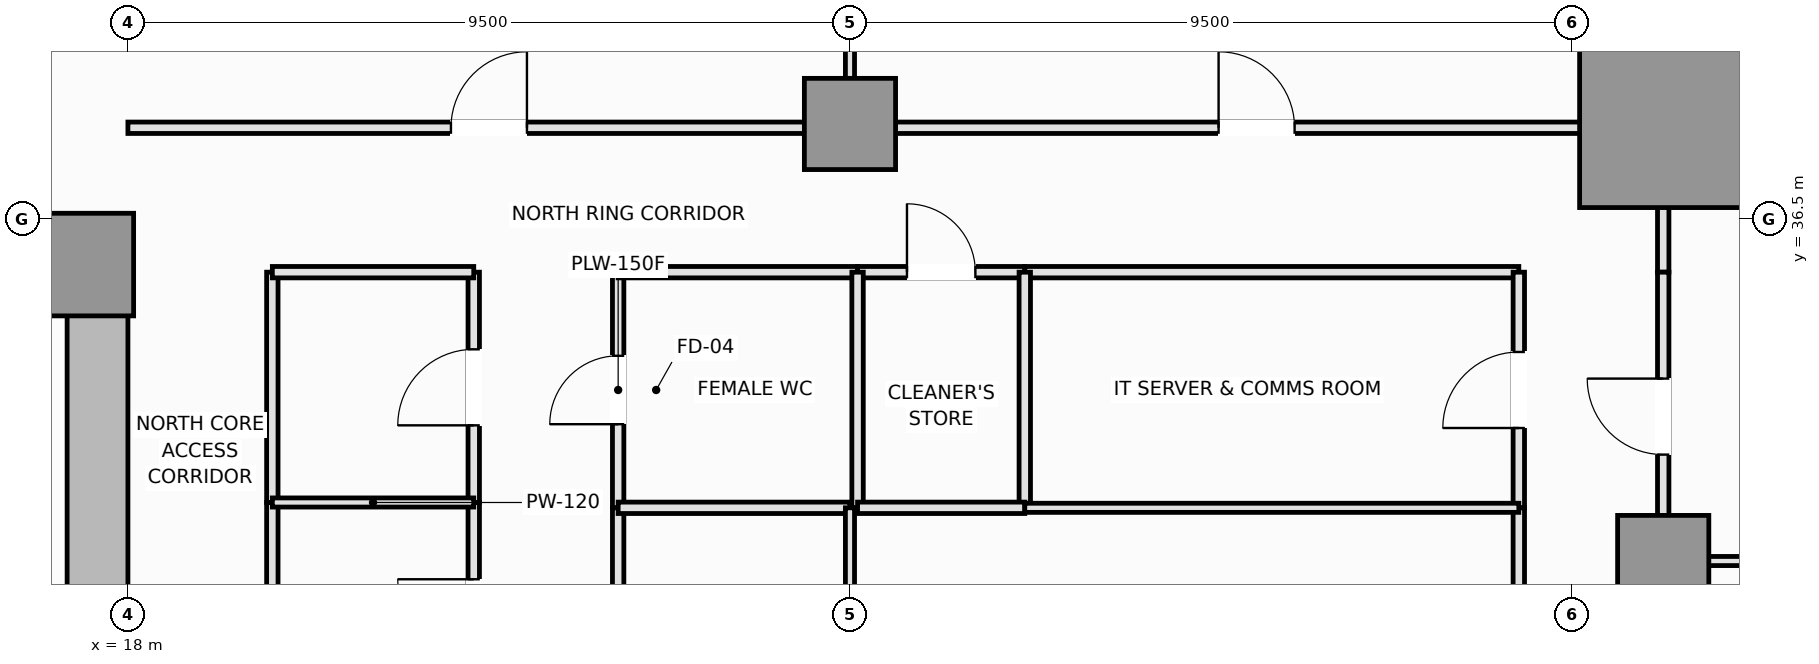
"""IFC4 building model, lengths in metres.
Left out: names, types, materials, properties, quantities, classifications, styles, units other than length and angle.
Written with IfcOpenShell. Run it as: python <this file> out.ifc"""

import sys

from ifc_helpers import new_model, si_unit, direction, frame, frame_2d, origin, origin_2d, place, context, subcontext, project, spatial, rectangle, extrude, element, fill, save


model = new_model("IFC4")
c1 = context("Model", 3, precision=1e-05, world=origin(), true_north=direction((0.0, 1.0)))
c2 = subcontext(c1, "Body", "Model", "MODEL_VIEW")
j1 = project(units=[si_unit("LENGTHUNIT", "METRE"), si_unit("PLANEANGLEUNIT", "RADIAN")], contexts=[c1])
p1 = place(None, origin())
s1 = spatial("IfcSite", under=j1, at=p1, CompositionType="ELEMENT")
p2 = place(p1, origin())
s2 = spatial("IfcBuilding", under=s1, at=p2, CompositionType="ELEMENT")
p3 = place(p2, frame((0.0, 0.0, 29.15)))
s3 = spatial("IfcBuildingStorey", under=s2, at=p3, CompositionType="ELEMENT", Elevation=29.15)
p4 = place(p3, frame((4.5, 36.1, 0.0), z_axis=(0.0, 0.0, 1.0), x_axis=(1.0, 0.0, 0.0)))
e1 = element("IfcWall", 1, at=p4, inside=s3, PredefinedType="SHEAR", context=c2, shape_type="SweptSolid", body=[
    extrude(rectangle(XDim=13.5, YDim=0.8, at=frame_2d((6.75, 0.0))), origin(), (0.0, 0.0, 1.0), 3.55),
])
p5 = place(p3, frame((17.6, 27.05, 0.0), z_axis=(0.0, 0.0, 1.0), x_axis=(0.0, 1.0, 0.0)))
e2 = element("IfcWall", 2, at=p5, inside=s3, PredefinedType="SHEAR", context=c2, shape_type="SweptSolid", body=[
    extrude(rectangle(XDim=8.65, YDim=0.8, at=frame_2d((4.325, 0.0))), origin(), (0.0, 0.0, 1.0), 3.55),
])
p6 = place(p5, frame((3.45, 0.0, 0.0)))
e3 = element("IfcOpeningElement", 3, at=p6, cuts=e2, PredefinedType="OPENING", context=c2, shape_type="SweptSolid", body=[
    extrude(rectangle(XDim=1.1, YDim=2.15, at=frame_2d((0.55, 1.075))), frame((0.0, 0.41, 0.0), z_axis=(0.0, -1.0, 0.0), x_axis=(1.0, 0.0, 0.0)), (0.0, 0.0, 1.0), 0.82),
])
p7 = place(p3, frame((17.4, 35.9, 0.0), z_axis=(0.0, 0.0, 1.0), x_axis=(1.0, 0.0, 0.0)))
e4 = element("IfcColumn", 4, at=p7, inside=s3, PredefinedType="PILASTER", context=c2, shape_type="SweptSolid", body=[
    extrude(rectangle(XDim=1.35, YDim=1.35, at=origin_2d()), origin(), (0.0, 0.0, 1.0), 3.55),
])
p8 = place(p3, frame((38.2, 37.75, 0.0), z_axis=(0.0, 0.0, 1.0), x_axis=(1.0, 0.0, 0.0)))
e5 = element("IfcColumn", 5, at=p8, inside=s3, PredefinedType="COLUMN", context=c2, shape_type="SweptSolid", body=[
    extrude(rectangle(XDim=2.2, YDim=2.2, at=origin_2d()), origin(), (0.0, 0.0, 1.0), 3.55),
])
for number, where, z_axis, x_axis in (
    (6, (27.5, 37.75, 0.0), (0.0, 0.0, 1.0), (1.0, 0.0, 0.0)),
    (7, (38.2, 32.0, 0.0), (0.0, 0.0, 1.0), (1.0, 0.0, 0.0)),
):
    element("IfcColumn", number, at=place(p3, frame(where, z_axis=z_axis, x_axis=x_axis)), inside=s3, PredefinedType="COLUMN", context=c2, shape_type="SweptSolid", body=[
        extrude(rectangle(XDim=1.2, YDim=1.2, at=origin_2d()), origin(), (0.0, 0.0, 1.0), 3.55),
    ])
p9 = place(p3, frame((22.55, 29.75, 0.0), z_axis=(0.0, 0.0, 1.0), x_axis=(0.0, 1.0, 0.0)))
e8 = element("IfcWall", 8, at=p9, inside=s3, PredefinedType="PARTITIONING", context=c2, shape_type="SweptSolid", body=[
    extrude(rectangle(XDim=3.02, YDim=0.15, at=frame_2d((1.51, 0.0))), origin(), (0.0, 0.0, 1.0), 3.01),
])
p10 = place(p9, frame((1.01, 0.0, 0.0)))
e9 = element("IfcOpeningElement", 9, at=p10, cuts=e8, PredefinedType="OPENING", context=c2, shape_type="SweptSolid", body=[
    extrude(rectangle(XDim=1.0, YDim=2.15, at=frame_2d((0.5, 1.075))), frame((0.0, 0.085, 0.0), z_axis=(0.0, -1.0, 0.0), x_axis=(1.0, 0.0, 0.0)), (0.0, 0.0, 1.0), 0.17),
])
p11 = place(p3, frame((22.55, 32.77, 0.0), z_axis=(0.0, 0.0, 1.0), x_axis=(0.0, 1.0, 0.0)))
e10 = element("IfcWall", 10, at=p11, inside=s3, PredefinedType="PARTITIONING", context=c2, shape_type="SweptSolid", body=[
    extrude(rectangle(XDim=3.03, YDim=0.15, at=frame_2d((1.515, 0.0))), origin(), (0.0, 0.0, 1.0), 3.01),
])
p12 = place(p11, frame((1.015, 0.0, 0.0)))
e11 = element("IfcOpeningElement", 11, at=p12, cuts=e10, PredefinedType="OPENING", context=c2, shape_type="SweptSolid", body=[
    extrude(rectangle(XDim=1.0, YDim=2.15, at=frame_2d((0.5, 1.075))), frame((0.0, 0.085, 0.0), z_axis=(0.0, -1.0, 0.0), x_axis=(1.0, 0.0, 0.0)), (0.0, 0.0, 1.0), 0.17),
])
p13 = place(p3, frame((24.45, 32.7, 0.0), z_axis=(0.0, 0.0, 1.0), x_axis=(0.0, 1.0, 0.0)))
e12 = element("IfcWall", 12, at=p13, inside=s3, PredefinedType="PLUMBINGWALL", context=c2, shape_type="SweptSolid", body=[
    extrude(rectangle(XDim=3.1, YDim=0.15, at=frame_2d((1.55, 0.0))), origin(), (0.0, 0.0, 1.0), 3.37),
])
p14 = place(p13, frame((1.1, 0.0, 0.0)))
e13 = element("IfcOpeningElement", 13, at=p14, cuts=e12, PredefinedType="OPENING", context=c2, shape_type="SweptSolid", body=[
    extrude(rectangle(XDim=0.9, YDim=2.1, at=frame_2d((0.45, 1.05))), frame((0.0, 0.085, 0.0), z_axis=(0.0, -1.0, 0.0), x_axis=(1.0, 0.0, 0.0)), (0.0, 0.0, 1.0), 0.17),
])
p15 = place(p3, frame((24.45, 17.8, 0.0), z_axis=(0.0, 0.0, 1.0), x_axis=(0.0, 1.0, 0.0)))
e14 = element("IfcWall", 14, at=p15, inside=s3, PredefinedType="PARTITIONING", context=c2, shape_type="SweptSolid", body=[
    extrude(rectangle(XDim=14.9, YDim=0.15, at=frame_2d((7.45, 0.0))), origin(), (0.0, 0.0, 1.0), 3.37),
])
p16 = place(p15, frame((6.95, 0.0, 0.0)))
e15 = element("IfcOpeningElement", 15, at=p16, cuts=e14, PredefinedType="OPENING", context=c2, shape_type="SweptSolid", body=[
    extrude(rectangle(XDim=1.0, YDim=2.15, at=frame_2d((0.5, 1.075))), frame((0.0, 0.085, 0.0), z_axis=(0.0, -1.0, 0.0), x_axis=(1.0, 0.0, 0.0)), (0.0, 0.0, 1.0), 0.17),
])
p17 = place(p3, frame((19.9, 29.75, 0.0), z_axis=(0.0, 0.0, 1.0), x_axis=(0.0, 1.0, 0.0)))
e16 = element("IfcWall", 16, at=p17, inside=s3, PredefinedType="PARTITIONING", context=c2, shape_type="SweptSolid", body=[
    extrude(rectangle(XDim=3.02, YDim=0.15, at=frame_2d((1.51, 0.0))), origin(), (0.0, 0.0, 1.0), 3.37),
])
p18 = place(p3, frame((19.9, 32.77, 0.0), z_axis=(0.0, 0.0, 1.0), x_axis=(0.0, 1.0, 0.0)))
e17 = element("IfcWall", 17, at=p18, inside=s3, PredefinedType="PARTITIONING", context=c2, shape_type="SweptSolid", body=[
    extrude(rectangle(XDim=3.03, YDim=0.15, at=frame_2d((1.515, 0.0))), origin(), (0.0, 0.0, 1.0), 3.37),
])
p19 = place(p3, frame((19.9, 35.8, 0.0), z_axis=(0.0, 0.0, 1.0), x_axis=(1.0, 0.0, 0.0)))
e18 = element("IfcWall", 18, at=p19, inside=s3, PredefinedType="PARTITIONING", context=c2, shape_type="SweptSolid", body=[
    extrude(rectangle(XDim=2.65, YDim=0.15, at=frame_2d((1.325, 0.0))), origin(), (0.0, 0.0, 1.0), 3.37),
])
p20 = place(p3, frame((24.45, 35.8, 0.0), z_axis=(0.0, 0.0, 1.0), x_axis=(1.0, 0.0, 0.0)))
e19 = element("IfcWall", 19, at=p20, inside=s3, PredefinedType="PLUMBINGWALL", context=c2, shape_type="SweptSolid", body=[
    extrude(rectangle(XDim=3.15, YDim=0.15, at=frame_2d((1.575, 0.0))), origin(), (0.0, 0.0, 1.0), 3.37),
])
p21 = place(p3, frame((27.6, 35.8, 0.0), z_axis=(0.0, 0.0, 1.0), x_axis=(1.0, 0.0, 0.0)))
e20 = element("IfcWall", 20, at=p21, inside=s3, PredefinedType="PLUMBINGWALL", context=c2, shape_type="SweptSolid", body=[
    extrude(rectangle(XDim=2.2, YDim=0.15, at=frame_2d((1.1, 0.0))), origin(), (0.0, 0.0, 1.0), 3.37),
])
p22 = place(p21, frame((0.65, 0.0, 0.0)))
e21 = element("IfcOpeningElement", 21, at=p22, cuts=e20, PredefinedType="OPENING", context=c2, shape_type="SweptSolid", body=[
    extrude(rectangle(XDim=0.9, YDim=2.1, at=frame_2d((0.45, 1.05))), frame((0.0, 0.085, 0.0), z_axis=(0.0, -1.0, 0.0), x_axis=(1.0, 0.0, 0.0)), (0.0, 0.0, 1.0), 0.17),
])
p23 = place(p3, frame((29.8, 35.8, 0.0), z_axis=(0.0, 0.0, 1.0), x_axis=(1.0, 0.0, 0.0)))
e22 = element("IfcWall", 22, at=p23, inside=s3, PredefinedType="PARTITIONING", context=c2, shape_type="SweptSolid", body=[
    extrude(rectangle(XDim=6.5, YDim=0.15, at=frame_2d((3.25, 0.0))), origin(), (0.0, 0.0, 1.0), 3.37),
])
p24 = place(p3, frame((18.0, 37.7, 0.0), z_axis=(0.0, 0.0, 1.0), x_axis=(1.0, 0.0, 0.0)))
e23 = element("IfcWall", 23, at=p24, inside=s3, PredefinedType="PARTITIONING", context=c2, shape_type="SweptSolid", body=[
    extrude(rectangle(XDim=9.5, YDim=0.15, at=frame_2d((4.75, 0.0))), origin(), (0.0, 0.0, 1.0), 2.72),
])
p25 = place(p24, frame((4.25, 0.0, 0.0)))
e24 = element("IfcOpeningElement", 24, at=p25, cuts=e23, PredefinedType="OPENING", context=c2, shape_type="SweptSolid", body=[
    extrude(rectangle(XDim=1.0, YDim=2.15, at=frame_2d((0.5, 1.075))), frame((0.0, 0.085, 0.0), z_axis=(0.0, -1.0, 0.0), x_axis=(1.0, 0.0, 0.0)), (0.0, 0.0, 1.0), 0.17),
])
p26 = place(p3, frame((27.5, 37.7, 0.0), z_axis=(0.0, 0.0, 1.0), x_axis=(1.0, 0.0, 0.0)))
e25 = element("IfcWall", 25, at=p26, inside=s3, PredefinedType="PARTITIONING", context=c2, shape_type="SweptSolid", body=[
    extrude(rectangle(XDim=10.7, YDim=0.15, at=frame_2d((5.35, 0.0))), origin(), (0.0, 0.0, 1.0), 2.72),
])
p27 = place(p26, frame((4.85, 0.0, 0.0)))
e26 = element("IfcOpeningElement", 26, at=p27, cuts=e25, PredefinedType="OPENING", context=c2, shape_type="SweptSolid", body=[
    extrude(rectangle(XDim=1.0, YDim=2.15, at=frame_2d((0.5, 1.075))), frame((0.0, 0.085, 0.0), z_axis=(0.0, -1.0, 0.0), x_axis=(1.0, 0.0, 0.0)), (0.0, 0.0, 1.0), 0.17),
])
p28 = place(p3, frame((38.2, 35.8, 0.0), z_axis=(0.0, 0.0, 1.0), x_axis=(0.0, 1.0, 0.0)))
e27 = element("IfcWall", 27, at=p28, inside=s3, PredefinedType="PARTITIONING", context=c2, shape_type="SweptSolid", body=[
    extrude(rectangle(XDim=1.9, YDim=0.15, at=frame_2d((0.95, 0.0))), origin(), (0.0, 0.0, 1.0), 2.82),
])
p29 = place(p3, frame((36.3, 32.7, 0.0), z_axis=(0.0, 0.0, 1.0), x_axis=(0.0, 1.0, 0.0)))
e28 = element("IfcWall", 28, at=p29, inside=s3, PredefinedType="PARTITIONING", context=c2, shape_type="SweptSolid", body=[
    extrude(rectangle(XDim=3.1, YDim=0.15, at=frame_2d((1.55, 0.0))), origin(), (0.0, 0.0, 1.0), 3.37),
])
p30 = place(p29, frame((1.05, 0.0, 0.0)))
e29 = element("IfcOpeningElement", 29, at=p30, cuts=e28, PredefinedType="OPENING", context=c2, shape_type="SweptSolid", body=[
    extrude(rectangle(XDim=1.0, YDim=2.15, at=frame_2d((0.5, 1.075))), frame((0.0, 0.085, 0.0), z_axis=(0.0, -1.0, 0.0), x_axis=(1.0, 0.0, 0.0)), (0.0, 0.0, 1.0), 0.17),
])
p31 = place(p3, frame((36.3, 17.8, 0.0), z_axis=(0.0, 0.0, 1.0), x_axis=(0.0, 1.0, 0.0)))
e30 = element("IfcWall", 30, at=p31, inside=s3, PredefinedType="PARTITIONING", context=c2, shape_type="SweptSolid", body=[
    extrude(rectangle(XDim=14.9, YDim=0.15, at=frame_2d((7.45, 0.0))), origin(), (0.0, 0.0, 1.0), 3.37),
])
p32 = place(p31, frame((8.364, 0.0, 0.0)))
e31 = element("IfcOpeningElement", 31, at=p32, cuts=e30, PredefinedType="OPENING", context=c2, shape_type="SweptSolid", body=[
    extrude(rectangle(XDim=1.0, YDim=2.15, at=frame_2d((0.5, 1.075))), frame((0.0, 0.085, 0.0), z_axis=(0.0, -1.0, 0.0), x_axis=(1.0, 0.0, 0.0)), (0.0, 0.0, 1.0), 0.17),
])
p33 = place(p3, frame((38.2, 25.25, 0.0), z_axis=(0.0, 0.0, 1.0), x_axis=(0.0, 1.0, 0.0)))
e32 = element("IfcWall", 32, at=p33, inside=s3, PredefinedType="PARTITIONING", context=c2, shape_type="SweptSolid", body=[
    extrude(rectangle(XDim=6.75, YDim=0.15, at=frame_2d((3.375, 0.0))), origin(), (0.0, 0.0, 1.0), 2.82),
])
p34 = place(p33, frame((2.875, 0.0, 0.0)))
e33 = element("IfcOpeningElement", 33, at=p34, cuts=e32, PredefinedType="OPENING", context=c2, shape_type="SweptSolid", body=[
    extrude(rectangle(XDim=1.0, YDim=2.15, at=frame_2d((0.5, 1.075))), frame((0.0, 0.085, 0.0), z_axis=(0.0, -1.0, 0.0), x_axis=(1.0, 0.0, 0.0)), (0.0, 0.0, 1.0), 0.17),
])
p35 = place(p3, frame((38.2, 32.0, 0.0), z_axis=(0.0, 0.0, 1.0), x_axis=(0.0, 1.0, 0.0)))
e34 = element("IfcWall", 34, at=p35, inside=s3, PredefinedType="PARTITIONING", context=c2, shape_type="SweptSolid", body=[
    extrude(rectangle(XDim=3.8, YDim=0.15, at=frame_2d((1.9, 0.0))), origin(), (0.0, 0.0, 1.0), 2.82),
])
p36 = place(p35, frame((1.4, 0.0, 0.0)))
e35 = element("IfcOpeningElement", 35, at=p36, cuts=e34, PredefinedType="OPENING", context=c2, shape_type="SweptSolid", body=[
    extrude(rectangle(XDim=1.0, YDim=2.15, at=frame_2d((0.5, 1.075))), frame((0.0, 0.085, 0.0), z_axis=(0.0, -1.0, 0.0), x_axis=(1.0, 0.0, 0.0)), (0.0, 0.0, 1.0), 0.17),
])
p37 = place(p3, frame((19.9, 32.77, 0.0), z_axis=(0.0, 0.0, 1.0), x_axis=(1.0, 0.0, 0.0)))
e36 = element("IfcWall", 36, at=p37, inside=s3, PredefinedType="PARTITIONING", context=c2, shape_type="SweptSolid", body=[
    extrude(rectangle(XDim=2.65, YDim=0.12, at=frame_2d((1.325, 0.0))), origin(), (0.0, 0.0, 1.0), 3.37),
])
p38 = place(p3, frame((27.6, 32.7, 0.0), z_axis=(0.0, 0.0, 1.0), x_axis=(0.0, 1.0, 0.0)))
e37 = element("IfcWall", 37, at=p38, inside=s3, PredefinedType="PLUMBINGWALL", context=c2, shape_type="SweptSolid", body=[
    extrude(rectangle(XDim=3.1, YDim=0.15, at=frame_2d((1.55, 0.0))), origin(), (0.0, 0.0, 1.0), 3.37),
])
p39 = place(p3, frame((24.45, 32.7, 0.0), z_axis=(0.0, 0.0, 1.0), x_axis=(1.0, 0.0, 0.0)))
e38 = element("IfcWall", 38, at=p39, inside=s3, PredefinedType="PLUMBINGWALL", context=c2, shape_type="SweptSolid", body=[
    extrude(rectangle(XDim=3.05, YDim=0.15, at=frame_2d((1.525, 0.0))), origin(), (0.0, 0.0, 1.0), 3.37),
])
p40 = place(p3, frame((29.8, 32.7, 0.0), z_axis=(0.0, 0.0, 1.0), x_axis=(0.0, 1.0, 0.0)))
e39 = element("IfcWall", 39, at=p40, inside=s3, PredefinedType="PLUMBINGWALL", context=c2, shape_type="SweptSolid", body=[
    extrude(rectangle(XDim=3.1, YDim=0.15, at=frame_2d((1.55, 0.0))), origin(), (0.0, 0.0, 1.0), 3.37),
])
p41 = place(p3, frame((27.6, 32.7, 0.0), z_axis=(0.0, 0.0, 1.0), x_axis=(1.0, 0.0, 0.0)))
e40 = element("IfcWall", 40, at=p41, inside=s3, PredefinedType="PLUMBINGWALL", context=c2, shape_type="SweptSolid", body=[
    extrude(rectangle(XDim=2.2, YDim=0.15, at=frame_2d((1.1, 0.0))), origin(), (0.0, 0.0, 1.0), 3.37),
])
p42 = place(p3, frame((29.8, 32.7, 0.0), z_axis=(0.0, 0.0, 1.0), x_axis=(1.0, 0.0, 0.0)))
e41 = element("IfcWall", 41, at=p42, inside=s3, PredefinedType="PARTITIONING", context=c2, shape_type="SweptSolid", body=[
    extrude(rectangle(XDim=6.5, YDim=0.12, at=frame_2d((3.25, 0.0))), origin(), (0.0, 0.0, 1.0), 3.37),
])
p43 = place(p3, frame((27.5, 17.8, 0.0), z_axis=(0.0, 0.0, 1.0), x_axis=(0.0, 1.0, 0.0)))
e42 = element("IfcWall", 42, at=p43, inside=s3, PredefinedType="PARTITIONING", context=c2, shape_type="SweptSolid", body=[
    extrude(rectangle(XDim=14.9, YDim=0.12, at=frame_2d((7.45, 0.0))), origin(), (0.0, 0.0, 1.0), 3.37),
])
for number, where, z_axis, x_axis in (
    (43, (27.5, 37.7, 0.0), (0.0, 0.0, 1.0), (0.0, 1.0, 0.0)),
    (44, (38.2, 37.7, 0.0), (0.0, 0.0, 1.0), (0.0, 1.0, 0.0)),
):
    element("IfcWall", number, at=place(p3, frame(where, z_axis=z_axis, x_axis=x_axis)), inside=s3, PredefinedType="PARTITIONING", context=c2, shape_type="SweptSolid", body=[
        extrude(rectangle(XDim=10.29, YDim=0.12, at=frame_2d((5.145, 0.0))), origin(), (0.0, 0.0, 1.0), 2.82),
    ])
p44 = place(p3, frame((38.2, 32.0, 0.0), z_axis=(0.0, 0.0, 1.0), x_axis=(1.0, 0.0, 0.0)))
e45 = element("IfcWall", 45, at=p44, inside=s3, PredefinedType="PARTITIONING", context=c2, shape_type="SweptSolid", body=[
    extrude(rectangle(XDim=15.29, YDim=0.12, at=frame_2d((7.645, 0.0))), origin(), (0.0, 0.0, 1.0), 2.72),
])
p45 = place(p10, origin())
e46 = element("IfcDoor", 46, at=p45, inside=s3, OperationType="SINGLE_SWING_RIGHT", PredefinedType="DOOR", context=c2, shape_type="SweptSolid", body=[
    extrude(rectangle(XDim=1.0, YDim=2.15, at=frame_2d((0.5, 1.075))), frame((0.0, 0.025, 0.0), z_axis=(0.0, -1.0, 0.0), x_axis=(1.0, 0.0, 0.0)), (0.0, 0.0, 1.0), 0.05),
])
fill(e9, e46)
p46 = place(p12, origin())
e47 = element("IfcDoor", 47, at=p46, inside=s3, OperationType="SINGLE_SWING_LEFT", PredefinedType="DOOR", context=c2, shape_type="SweptSolid", body=[
    extrude(rectangle(XDim=1.0, YDim=2.15, at=frame_2d((0.5, 1.075))), frame((0.0, 0.025, 0.0), z_axis=(0.0, -1.0, 0.0), x_axis=(1.0, 0.0, 0.0)), (0.0, 0.0, 1.0), 0.05),
])
fill(e11, e47)
p47 = place(p14, origin())
e48 = element("IfcDoor", 48, at=p47, inside=s3, OperationType="SINGLE_SWING_LEFT", PredefinedType="DOOR", context=c2, shape_type="SweptSolid", body=[
    extrude(rectangle(XDim=0.9, YDim=2.1, at=frame_2d((0.45, 1.05))), frame((0.0, 0.025, 0.0), z_axis=(0.0, -1.0, 0.0), x_axis=(1.0, 0.0, 0.0)), (0.0, 0.0, 1.0), 0.05),
])
fill(e13, e48)
p48 = place(p22, origin())
e49 = element("IfcDoor", 49, at=p48, inside=s3, OperationType="SINGLE_SWING_LEFT", PredefinedType="DOOR", context=c2, shape_type="SweptSolid", body=[
    extrude(rectangle(XDim=0.9, YDim=2.1, at=frame_2d((0.45, 1.05))), frame((0.0, 0.025, 0.0), z_axis=(0.0, -1.0, 0.0), x_axis=(1.0, 0.0, 0.0)), (0.0, 0.0, 1.0), 0.05),
])
fill(e21, e49)
p49 = place(p25, origin())
e50 = element("IfcDoor", 50, at=p49, inside=s3, OperationType="SINGLE_SWING_RIGHT", PredefinedType="DOOR", context=c2, shape_type="SweptSolid", body=[
    extrude(rectangle(XDim=1.0, YDim=2.15, at=frame_2d((0.5, 1.075))), frame((0.0, 0.025, 0.0), z_axis=(0.0, -1.0, 0.0), x_axis=(1.0, 0.0, 0.0)), (0.0, 0.0, 1.0), 0.05),
])
fill(e24, e50)
p50 = place(p27, origin())
e51 = element("IfcDoor", 51, at=p50, inside=s3, OperationType="SINGLE_SWING_LEFT", PredefinedType="DOOR", context=c2, shape_type="SweptSolid", body=[
    extrude(rectangle(XDim=1.0, YDim=2.15, at=frame_2d((0.5, 1.075))), frame((0.0, 0.025, 0.0), z_axis=(0.0, -1.0, 0.0), x_axis=(1.0, 0.0, 0.0)), (0.0, 0.0, 1.0), 0.05),
])
fill(e26, e51)
p51 = place(p30, origin())
e52 = element("IfcDoor", 52, at=p51, inside=s3, OperationType="SINGLE_SWING_LEFT", PredefinedType="DOOR", context=c2, shape_type="SweptSolid", body=[
    extrude(rectangle(XDim=1.0, YDim=2.15, at=frame_2d((0.5, 1.075))), frame((0.0, 0.025, 0.0), z_axis=(0.0, -1.0, 0.0), x_axis=(1.0, 0.0, 0.0)), (0.0, 0.0, 1.0), 0.05),
])
fill(e29, e52)
p52 = place(p36, origin())
e53 = element("IfcDoor", 53, at=p52, inside=s3, OperationType="SINGLE_SWING_RIGHT", PredefinedType="DOOR", context=c2, shape_type="SweptSolid", body=[
    extrude(rectangle(XDim=1.0, YDim=2.15, at=frame_2d((0.5, 1.075))), frame((0.0, 0.025, 0.0), z_axis=(0.0, -1.0, 0.0), x_axis=(1.0, 0.0, 0.0)), (0.0, 0.0, 1.0), 0.05),
])
fill(e35, e53)
save(model, sys.argv[1])
